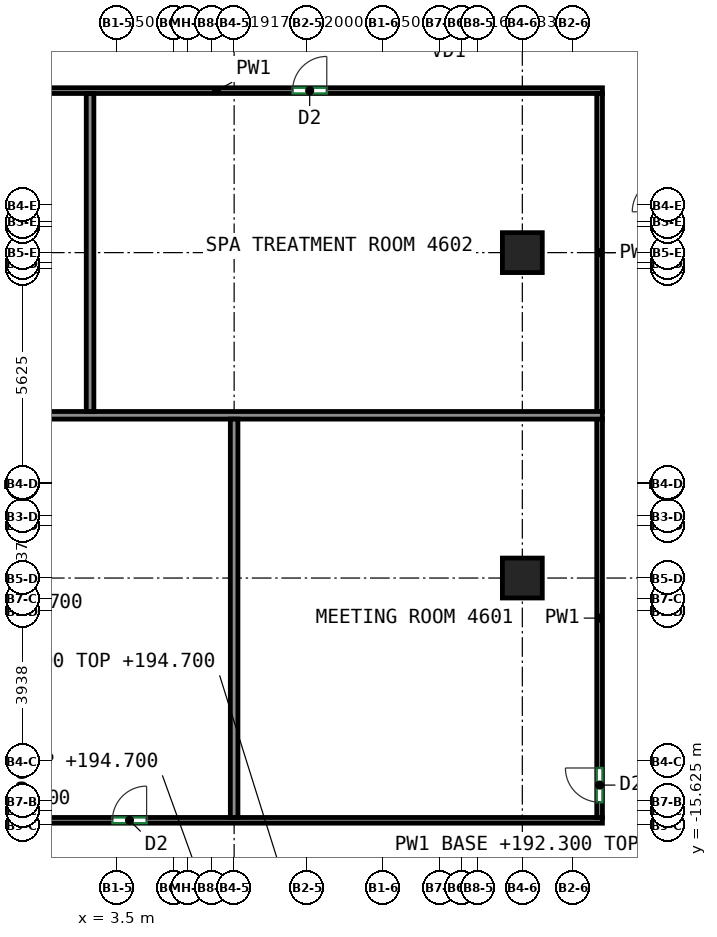
"""IFC4 building model, lengths in metres.
Left out: names, types, materials, properties, quantities, classifications, styles, units other than length and angle.
Written with IfcOpenShell. Run it as: python <this file> out.ifc"""

import sys

from ifc_helpers import new_model, si_unit, direction, frame, frame_2d, origin, origin_2d, place, context, subcontext, project, spatial, rectangle, extrude, source, transform, mapped, element, fill, save


model = new_model("IFC4")
c1 = context("Model", 3, precision=1e-05, world=origin(), true_north=direction((0.0, 1.0)))
c2 = subcontext(c1, "Body", "Model", "MODEL_VIEW")
j1 = project(units=[si_unit("LENGTHUNIT", "METRE"), si_unit("PLANEANGLEUNIT", "RADIAN")], contexts=[c1])
p1 = place(None, origin())
s1 = spatial("IfcSite", under=j1, at=p1, CompositionType="ELEMENT")
p2 = place(p1, origin())
s2 = spatial("IfcBuilding", under=s1, at=p2, CompositionType="ELEMENT")
p3 = place(p2, frame((0.0, 0.0, 192.3)))
s3 = spatial("IfcBuildingStorey", under=s2, at=p3, CompositionType="ELEMENT", Elevation=192.3)
m1 = source(origin(), c2, "Body", "SweptSolid", [
    extrude(rectangle(XDim=1.05, YDim=1.05, at=origin_2d()), origin(), (0.0, 0.0, 1.0), 3.0),
])
for number, where, z_axis, x_axis in (
    (1, (14.167, -9.125, 0.0), (0.0, 0.0, 1.0), (1.0, 0.0, 0.0)),
    (2, (14.167, -0.562, 0.0), (0.0, 0.0, 1.0), (1.0, 0.0, 0.0)),
):
    element("IfcColumn", number, at=place(p3, frame(where, z_axis=z_axis, x_axis=x_axis)), inside=s3, PredefinedType="COLUMN", context=c2, shape_type="MappedRepresentation", body=[
        mapped(m1, transform((0.0, 0.0, 0.0))),
    ])
p4 = place(p3, frame((-17.575, 3.7, 0.0), z_axis=(0.0, 0.0, 1.0), x_axis=(1.0, 0.0, 0.0)))
e3 = element("IfcWall", 3, at=p4, inside=s3, PredefinedType="PARTITIONING", context=c2, shape_type="SweptSolid", body=[
    extrude(rectangle(XDim=33.85, YDim=0.15, at=frame_2d((16.925, 0.0))), origin(), (0.0, 0.0, 1.0), 3.0),
])
p5 = place(p4, frame((10.584, 0.0, 0.0)))
e4 = element("IfcOpeningElement", 4, at=p5, cuts=e3, PredefinedType="OPENING", context=c2, shape_type="SweptSolid", body=[
    extrude(rectangle(XDim=0.9, YDim=2.1, at=frame_2d((0.45, 1.05))), frame((0.0, 0.085, 0.0), z_axis=(0.0, -1.0, 0.0), x_axis=(1.0, 0.0, 0.0)), (0.0, 0.0, 1.0), 0.17),
])
p6 = place(p4, frame((16.175, 0.0, 0.0)))
e5 = element("IfcOpeningElement", 5, at=p6, cuts=e3, PredefinedType="OPENING", context=c2, shape_type="SweptSolid", body=[
    extrude(rectangle(XDim=0.9, YDim=2.1, at=frame_2d((0.45, 1.05))), frame((0.0, 0.085, 0.0), z_axis=(0.0, -1.0, 0.0), x_axis=(1.0, 0.0, 0.0)), (0.0, 0.0, 1.0), 0.17),
])
p7 = place(p4, frame((25.696, 0.0, 0.0)))
e6 = element("IfcOpeningElement", 6, at=p7, cuts=e3, PredefinedType="OPENING", context=c2, shape_type="SweptSolid", body=[
    extrude(rectangle(XDim=0.9, YDim=2.1, at=frame_2d((0.45, 1.05))), frame((0.0, 0.085, 0.0), z_axis=(0.0, -1.0, 0.0), x_axis=(1.0, 0.0, 0.0)), (0.0, 0.0, 1.0), 0.17),
])
p8 = place(p3, frame((16.2, -4.753, 0.0), z_axis=(0.0, 0.0, 1.0), x_axis=(0.0, 1.0, 0.0)))
e7 = element("IfcWall", 7, at=p8, inside=s3, PredefinedType="PARTITIONING", context=c2, shape_type="SweptSolid", body=[
    extrude(rectangle(XDim=8.378, YDim=0.15, at=frame_2d((4.189, 0.0))), origin(), (0.0, 0.0, 1.0), 3.0),
])
p9 = place(p3, frame((-8.593, -15.5, 0.0), z_axis=(0.0, 0.0, 1.0), x_axis=(1.0, 0.0, 0.0)))
e8 = element("IfcWall", 8, at=p9, inside=s3, PredefinedType="PARTITIONING", context=c2, shape_type="SweptSolid", body=[
    extrude(rectangle(XDim=24.868, YDim=0.15, at=frame_2d((12.434, 0.0))), origin(), (0.0, 0.0, 1.0), 3.0),
])
p10 = place(p9, frame((11.973, 0.0, 0.0)))
e9 = element("IfcOpeningElement", 9, at=p10, cuts=e8, PredefinedType="OPENING", context=c2, shape_type="SweptSolid", body=[
    extrude(rectangle(XDim=0.9, YDim=2.1, at=frame_2d((0.45, 1.05))), frame((0.0, 0.085, 0.0), z_axis=(0.0, -1.0, 0.0), x_axis=(1.0, 0.0, 0.0)), (0.0, 0.0, 1.0), 0.17),
])
p11 = place(p3, frame((16.2, -15.425, 0.0), z_axis=(0.0, 0.0, 1.0), x_axis=(0.0, 1.0, 0.0)))
e10 = element("IfcWall", 10, at=p11, inside=s3, PredefinedType="PARTITIONING", context=c2, shape_type="SweptSolid", body=[
    extrude(rectangle(XDim=10.492, YDim=0.15, at=frame_2d((5.246, 0.0))), origin(), (0.0, 0.0, 1.0), 3.0),
])
p12 = place(p11, frame((0.402, 0.0, 0.0)))
e11 = element("IfcOpeningElement", 11, at=p12, cuts=e10, PredefinedType="OPENING", context=c2, shape_type="SweptSolid", body=[
    extrude(rectangle(XDim=0.9, YDim=2.1, at=frame_2d((0.45, 1.05))), frame((0.0, 0.085, 0.0), z_axis=(0.0, -1.0, 0.0), x_axis=(1.0, 0.0, 0.0)), (0.0, 0.0, 1.0), 0.17),
])
p13 = place(p3, frame((-13.873, -4.843, 0.0), z_axis=(0.0, 0.0, 1.0), x_axis=(1.0, 0.0, 0.0)))
e12 = element("IfcWall", 12, at=p13, inside=s3, PredefinedType="PARTITIONING", context=c2, shape_type="SweptSolid", body=[
    extrude(rectangle(XDim=30.146, YDim=0.2, at=frame_2d((15.073, 0.0))), origin(), (0.0, 0.0, 1.0), 3.0),
])
p14 = place(p3, frame((2.792, -4.743, 0.0), z_axis=(0.0, 0.0, 1.0), x_axis=(0.0, 1.0, 0.0)))
e13 = element("IfcWall", 13, at=p14, inside=s3, PredefinedType="PARTITIONING", context=c2, shape_type="SweptSolid", body=[
    extrude(rectangle(XDim=8.366, YDim=0.2, at=frame_2d((4.183, 0.0))), origin(), (0.0, 0.0, 1.0), 3.0),
])
p15 = place(p3, frame((6.583, -15.423, 0.0), z_axis=(0.0, 0.0, 1.0), x_axis=(0.0, 1.0, 0.0)))
e14 = element("IfcWall", 14, at=p15, inside=s3, PredefinedType="PARTITIONING", context=c2, shape_type="SweptSolid", body=[
    extrude(rectangle(XDim=10.48, YDim=0.2, at=frame_2d((5.24, 0.0))), origin(), (0.0, 0.0, 1.0), 3.0),
])
p16 = place(p10, origin())
e15 = element("IfcDoor", 15, at=p16, inside=s3, OperationType="SINGLE_SWING_RIGHT", PredefinedType="DOOR", context=c2, shape_type="SweptSolid", body=[
    extrude(rectangle(XDim=0.9, YDim=2.1, at=frame_2d((0.45, 1.05))), frame((0.0, 0.025, 0.0), z_axis=(0.0, -1.0, 0.0), x_axis=(1.0, 0.0, 0.0)), (0.0, 0.0, 1.0), 0.05),
])
fill(e9, e15)
p17 = place(p12, origin())
e16 = element("IfcDoor", 16, at=p17, inside=s3, OperationType="SINGLE_SWING_RIGHT", PredefinedType="DOOR", context=c2, shape_type="SweptSolid", body=[
    extrude(rectangle(XDim=0.9, YDim=2.1, at=frame_2d((0.45, 1.05))), frame((0.0, 0.025, 0.0), z_axis=(0.0, -1.0, 0.0), x_axis=(1.0, 0.0, 0.0)), (0.0, 0.0, 1.0), 0.05),
])
fill(e11, e16)
p18 = place(p7, origin())
e17 = element("IfcDoor", 17, at=p18, inside=s3, OperationType="SINGLE_SWING_RIGHT", PredefinedType="DOOR", context=c2, shape_type="SweptSolid", body=[
    extrude(rectangle(XDim=0.9, YDim=2.1, at=frame_2d((0.45, 1.05))), frame((0.0, 0.025, 0.0), z_axis=(0.0, -1.0, 0.0), x_axis=(1.0, 0.0, 0.0)), (0.0, 0.0, 1.0), 0.05),
])
fill(e6, e17)
save(model, sys.argv[1])
